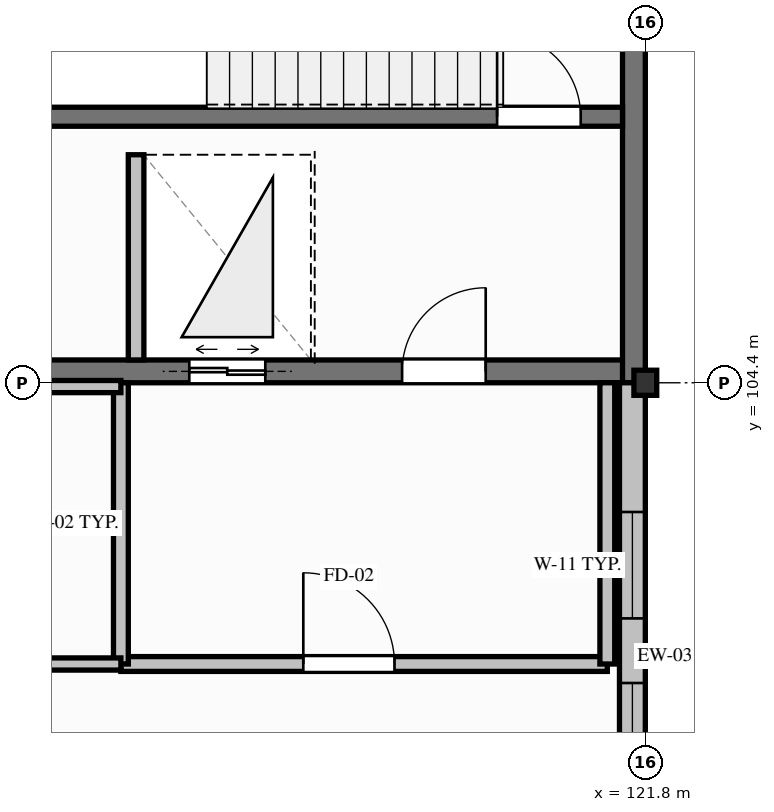
"""IFC4 building model, lengths in metres.
Left out: names, types, materials, properties, quantities, classifications, styles, units other than length and angle.
Written with IfcOpenShell. Run it as: python <this file> out.ifc"""

import sys

from ifc_helpers import new_model, si_unit, direction, frame, frame_2d, origin, origin_2d, place, context, subcontext, project, spatial, rectangle, i_section, extrude, element, fill, save


model = new_model("IFC4")
c1 = context("Model", 3, precision=1e-05, world=origin(), true_north=direction((0.0, 1.0)))
c2 = subcontext(c1, "Body", "Model", "MODEL_VIEW")
j1 = project(units=[si_unit("LENGTHUNIT", "METRE"), si_unit("PLANEANGLEUNIT", "RADIAN")], contexts=[c1])
p1 = place(None, origin())
s1 = spatial("IfcSite", under=j1, at=p1, CompositionType="ELEMENT")
p2 = place(p1, origin())
s2 = spatial("IfcBuilding", under=s1, at=p2, CompositionType="ELEMENT")
p3 = place(p2, frame((0.0, 0.0, 21.3)))
s3 = spatial("IfcBuildingStorey", under=s2, at=p3, CompositionType="ELEMENT", Elevation=21.3)
p4 = place(p3, frame((113.4, 104.55, 0.0), z_axis=(0.0, 0.0, 1.0), x_axis=(1.0, 0.0, 0.0)))
e1 = element("IfcWall", 1, at=p4, inside=s3, PredefinedType="SHEAR", context=c2, shape_type="SweptSolid", body=[
    extrude(rectangle(XDim=8.4, YDim=0.3, at=frame_2d((4.2, 0.0))), origin(), (0.0, 0.0, 1.0), 4.05),
])
p5 = place(p4, frame((5.2, 0.0, 0.0)))
e2 = element("IfcOpeningElement", 2, at=p5, cuts=e1, PredefinedType="OPENING", context=c2, shape_type="SweptSolid", body=[
    extrude(rectangle(XDim=1.1, YDim=2.15, at=frame_2d((0.55, 1.075))), frame((0.0, 0.16, 0.0), z_axis=(0.0, -1.0, 0.0), x_axis=(1.0, 0.0, 0.0)), (0.0, 0.0, 1.0), 0.32),
])
p6 = place(p4, frame((2.4, 0.0, 0.0)))
e3 = element("IfcOpeningElement", 3, at=p6, cuts=e1, PredefinedType="OPENING", context=c2, shape_type="SweptSolid", body=[
    extrude(rectangle(XDim=1.0, YDim=2.1, at=frame_2d((0.5, 1.05))), frame((0.0, 0.16, 0.0), z_axis=(0.0, -1.0, 0.0), x_axis=(1.0, 0.0, 0.0)), (0.0, 0.0, 1.0), 0.32),
])
p7 = place(p3, frame((121.65, 111.6, 0.0), z_axis=(0.0, 0.0, 1.0), x_axis=(0.0, -1.0, 0.0)))
e4 = element("IfcWall", 4, at=p7, inside=s3, PredefinedType="SHEAR", context=c2, shape_type="SweptSolid", body=[
    extrude(rectangle(XDim=7.2, YDim=0.3, at=frame_2d((3.6, 0.0))), origin(), (0.0, 0.0, 1.0), 4.05),
])
p8 = place(p3, frame((113.7, 107.9, 0.0), z_axis=(0.0, 0.0, 1.0), x_axis=(1.0, 0.0, 0.0)))
e5 = element("IfcWall", 5, at=p8, inside=s3, PredefinedType="SHEAR", context=c2, shape_type="SweptSolid", body=[
    extrude(rectangle(XDim=7.8, YDim=0.25, at=frame_2d((3.9, 0.0))), origin(), (0.0, 0.0, 1.0), 4.05),
])
p9 = place(p8, frame((6.15, 0.0, 0.0)))
e6 = element("IfcOpeningElement", 6, at=p9, cuts=e5, PredefinedType="OPENING", context=c2, shape_type="SweptSolid", body=[
    extrude(rectangle(XDim=1.1, YDim=2.15, at=frame_2d((0.55, 1.075))), frame((0.0, 0.135, 0.0), z_axis=(0.0, -1.0, 0.0), x_axis=(1.0, 0.0, 0.0)), (0.0, 0.0, 1.0), 0.27),
])
p10 = place(p3, frame((121.8, 104.4, 0.0), z_axis=(0.0, 0.0, 1.0), x_axis=(1.0, 0.0, 0.0)))
e7 = element("IfcColumn", 7, at=p10, inside=s3, PredefinedType="COLUMN", context=c2, shape_type="SweptSolid", body=[
    extrude(i_section(OverallWidth=0.3, OverallDepth=0.33, WebThickness=0.01, FlangeThickness=0.017, FilletRadius=0.027, at=origin_2d()), origin(), (0.0, 0.0, 1.0), 4.05),
])
p11 = place(p3, frame((121.63, 104.4, 0.0), z_axis=(0.0, 0.0, 1.0), x_axis=(0.0, -1.0, 0.0)))
e8 = element("IfcWall", 8, at=p11, inside=s3, PredefinedType="SOLIDWALL", context=c2, shape_type="SweptSolid", body=[
    extrude(rectangle(XDim=7.2, YDim=0.34, at=frame_2d((3.6, 0.0))), origin(), (0.0, 0.0, 1.0), 3.228),
])
p12 = place(p11, frame((1.7, 0.0, 0.85)))
e9 = element("IfcOpeningElement", 9, at=p12, cuts=e8, PredefinedType="OPENING", context=c2, shape_type="SweptSolid", body=[
    extrude(rectangle(XDim=1.4, YDim=1.65, at=frame_2d((0.7, 0.825))), frame((0.0, 0.18, 0.0), z_axis=(0.0, -1.0, 0.0), x_axis=(1.0, 0.0, 0.0)), (0.0, 0.0, 1.0), 0.36),
])
p13 = place(p11, frame((3.95, 0.0, 0.85)))
e10 = element("IfcOpeningElement", 10, at=p13, cuts=e8, PredefinedType="OPENING", context=c2, shape_type="SweptSolid", body=[
    extrude(rectangle(XDim=1.7, YDim=1.75, at=frame_2d((0.85, 0.875))), frame((0.0, 0.18, 0.0), z_axis=(0.0, -1.0, 0.0), x_axis=(1.0, 0.0, 0.0)), (0.0, 0.0, 1.0), 0.36),
])
p14 = place(p3, frame((115.1, 104.7, 0.0), z_axis=(0.0, 0.0, 1.0), x_axis=(0.0, 1.0, 0.0)))
e11 = element("IfcWall", 11, at=p14, inside=s3, PredefinedType="PARTITIONING", context=c2, shape_type="SweptSolid", body=[
    extrude(rectangle(XDim=2.7, YDim=0.205, at=frame_2d((1.35, 0.0))), origin(), (0.0, 0.0, 1.0), 3.388),
])
p15 = place(p3, frame((114.9, 100.7, 0.0), z_axis=(0.0, 0.0, 1.0), x_axis=(1.0, 0.0, 0.0)))
e12 = element("IfcWall", 12, at=p15, inside=s3, PredefinedType="PARTITIONING", context=c2, shape_type="SweptSolid", body=[
    extrude(rectangle(XDim=6.4, YDim=0.195, at=frame_2d((3.2, 0.0))), origin(), (0.0, 0.0, 1.0), 3.78),
])
p16 = place(p15, frame((2.4, 0.0, 0.0)))
e13 = element("IfcOpeningElement", 13, at=p16, cuts=e12, PredefinedType="OPENING", context=c2, shape_type="SweptSolid", body=[
    extrude(rectangle(XDim=1.2, YDim=2.15, at=frame_2d((0.6, 1.075))), frame((0.0, 0.107, 0.0), z_axis=(0.0, -1.0, 0.0), x_axis=(1.0, 0.0, 0.0)), (0.0, 0.0, 1.0), 0.215),
])
for number, where, z_axis, x_axis in (
    (14, (121.3, 100.7, 0.0), (0.0, 0.0, 1.0), (0.0, 1.0, 0.0)),
    (15, (114.9, 100.7, 0.0), (0.0, 0.0, 1.0), (0.0, 1.0, 0.0)),
):
    element("IfcWall", number, at=place(p3, frame(where, z_axis=z_axis, x_axis=x_axis)), inside=s3, PredefinedType="PARTITIONING", context=c2, shape_type="SweptSolid", body=[
        extrude(rectangle(XDim=3.7, YDim=0.195, at=frame_2d((1.85, 0.0))), origin(), (0.0, 0.0, 1.0), 3.388),
    ])
p17 = place(p3, frame((78.7, 100.7, 0.0), z_axis=(0.0, 0.0, 1.0), x_axis=(1.0, 0.0, 0.0)))
e16 = element("IfcWall", 16, at=p17, inside=s3, PredefinedType="PARTITIONING", context=c2, shape_type="SweptSolid", body=[
    extrude(rectangle(XDim=36.2, YDim=0.16, at=frame_2d((18.1, 0.0))), origin(), (0.0, 0.0, 1.0), 3.378),
])
p18 = place(p17, frame((10.5, 0.0, 0.0)))
e17 = element("IfcOpeningElement", 17, at=p18, cuts=e16, PredefinedType="OPENING", context=c2, shape_type="SweptSolid", body=[
    extrude(rectangle(XDim=1.68, YDim=2.26, at=frame_2d((0.84, 1.13))), frame((0.0, 0.09, 0.0), z_axis=(0.0, -1.0, 0.0), x_axis=(1.0, 0.0, 0.0)), (0.0, 0.0, 1.0), 0.18),
])
p19 = place(p3, frame((78.7, 104.35, 0.0), z_axis=(0.0, 0.0, 1.0), x_axis=(1.0, 0.0, 0.0)))
e18 = element("IfcWall", 18, at=p19, inside=s3, PredefinedType="PARTITIONING", context=c2, shape_type="SweptSolid", body=[
    extrude(rectangle(XDim=36.2, YDim=0.16, at=frame_2d((18.1, 0.0))), origin(), (0.0, 0.0, 1.0), 3.178),
])
p20 = place(p19, frame((18.59, 0.0, 0.0)))
e19 = element("IfcOpeningElement", 19, at=p20, cuts=e18, PredefinedType="OPENING", context=c2, shape_type="SweptSolid", body=[
    extrude(rectangle(XDim=1.02, YDim=2.15, at=frame_2d((0.51, 1.075))), frame((0.0, 0.09, 0.0), z_axis=(0.0, -1.0, 0.0), x_axis=(1.0, 0.0, 0.0)), (0.0, 0.0, 1.0), 0.18),
])
p21 = place(p12, origin())
e20 = element("IfcWindow", 20, at=p21, inside=s3, PartitioningType="SINGLE_PANEL", PredefinedType="WINDOW", context=c2, shape_type="SweptSolid", body=[
    extrude(rectangle(XDim=1.4, YDim=1.65, at=frame_2d((0.7, 0.825))), frame((0.0, 0.03, 0.0), z_axis=(0.0, -1.0, 0.0), x_axis=(1.0, 0.0, 0.0)), (0.0, 0.0, 1.0), 0.06),
])
fill(e9, e20)
p22 = place(p13, origin())
e21 = element("IfcWindow", 21, at=p22, inside=s3, PartitioningType="SINGLE_PANEL", PredefinedType="WINDOW", context=c2, shape_type="SweptSolid", body=[
    extrude(rectangle(XDim=1.7, YDim=1.75, at=frame_2d((0.85, 0.875))), frame((0.0, 0.03, 0.0), z_axis=(0.0, -1.0, 0.0), x_axis=(1.0, 0.0, 0.0)), (0.0, 0.0, 1.0), 0.06),
])
fill(e10, e21)
p23 = place(p9, origin())
e22 = element("IfcDoor", 22, at=p23, inside=s3, OperationType="SINGLE_SWING_LEFT", PredefinedType="DOOR", context=c2, shape_type="SweptSolid", body=[
    extrude(rectangle(XDim=1.1, YDim=2.15, at=frame_2d((0.55, 1.075))), frame((0.0, 0.025, 0.0), z_axis=(0.0, -1.0, 0.0), x_axis=(1.0, 0.0, 0.0)), (0.0, 0.0, 1.0), 0.05),
])
fill(e6, e22)
p24 = place(p5, origin())
e23 = element("IfcDoor", 23, at=p24, inside=s3, OperationType="SINGLE_SWING_RIGHT", PredefinedType="DOOR", context=c2, shape_type="SweptSolid", body=[
    extrude(rectangle(XDim=1.1, YDim=2.15, at=frame_2d((0.55, 1.075))), frame((0.0, 0.025, 0.0), z_axis=(0.0, -1.0, 0.0), x_axis=(1.0, 0.0, 0.0)), (0.0, 0.0, 1.0), 0.05),
])
fill(e2, e23)
p25 = place(p6, origin())
e24 = element("IfcDoor", 24, at=p25, inside=s3, OperationType="DOUBLE_DOOR_SLIDING", PredefinedType="DOOR", context=c2, shape_type="SweptSolid", body=[
    extrude(rectangle(XDim=1.0, YDim=2.1, at=frame_2d((0.5, 1.05))), frame((0.0, 0.025, 0.0), z_axis=(0.0, -1.0, 0.0), x_axis=(1.0, 0.0, 0.0)), (0.0, 0.0, 1.0), 0.05),
])
fill(e3, e24)
p26 = place(p16, origin())
e25 = element("IfcDoor", 25, at=p26, inside=s3, OperationType="SINGLE_SWING_LEFT", PredefinedType="DOOR", context=c2, shape_type="SweptSolid", body=[
    extrude(rectangle(XDim=1.2, YDim=2.15, at=frame_2d((0.6, 1.075))), frame((0.0, 0.025, 0.0), z_axis=(0.0, -1.0, 0.0), x_axis=(1.0, 0.0, 0.0)), (0.0, 0.0, 1.0), 0.05),
])
fill(e13, e25)
save(model, sys.argv[1])
